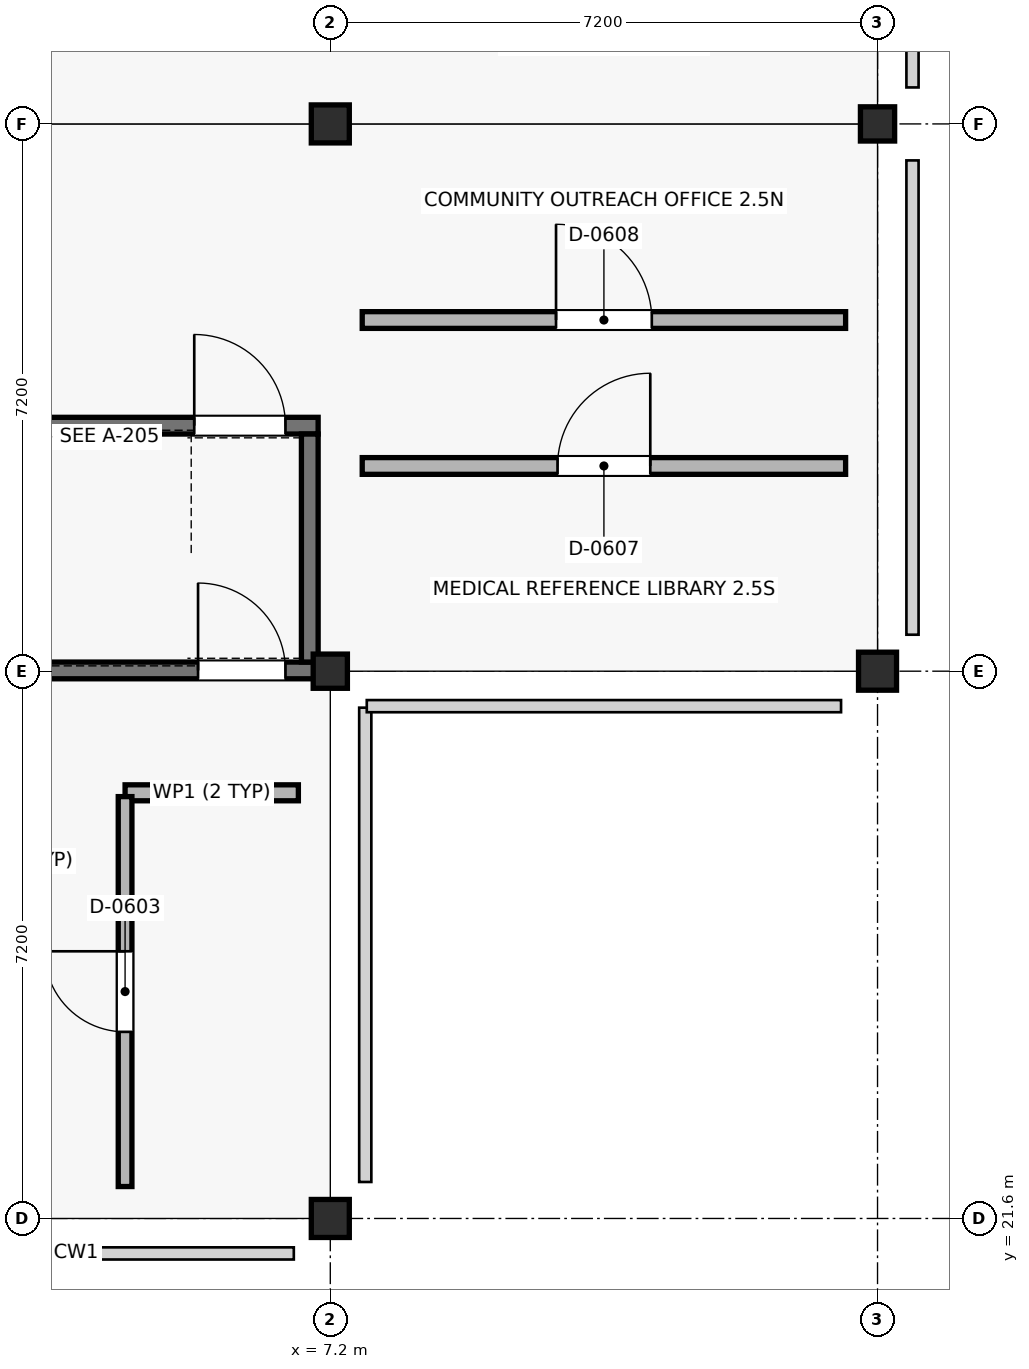
"""IFC4 building model, lengths in metres.
Left out: names, types, materials, properties, quantities, classifications, styles, units other than length and angle.
Written with IfcOpenShell. Run it as: python <this file> out.ifc"""

import sys

from ifc_helpers import new_model, si_unit, direction, frame, frame_2d, origin, origin_2d, place, context, subcontext, project, spatial, rectangle, extrude, element, fill, save


model = new_model("IFC4")
c1 = context("Model", 3, precision=1e-05, world=origin(), true_north=direction((0.0, 1.0)))
c2 = subcontext(c1, "Body", "Model", "MODEL_VIEW")
j1 = project(units=[si_unit("LENGTHUNIT", "METRE"), si_unit("PLANEANGLEUNIT", "RADIAN")], contexts=[c1])
p1 = place(None, origin())
s1 = spatial("IfcSite", under=j1, at=p1, CompositionType="ELEMENT")
p2 = place(p1, origin())
s2 = spatial("IfcBuilding", under=s1, at=p2, CompositionType="ELEMENT")
p3 = place(p2, frame((0.0, 0.0, 13.5)))
s3 = spatial("IfcBuildingStorey", under=s2, at=p3, CompositionType="ELEMENT", Elevation=13.5)
p4 = place(p3, frame((7.2, 21.6, 0.0), z_axis=(0.0, 0.0, 1.0), x_axis=(1.0, 0.0, 0.0)))
e1 = element("IfcColumn", 1, at=p4, inside=s3, PredefinedType="COLUMN", context=c2, shape_type="SweptSolid", body=[
    extrude(rectangle(XDim=0.5, YDim=0.5, at=origin_2d()), origin(), (0.0, 0.0, 1.0), 3.83),
])
p5 = place(p3, frame((7.2, 28.8, 0.0), z_axis=(0.0, 0.0, 1.0), x_axis=(1.0, 0.0, 0.0)))
e2 = element("IfcColumn", 2, at=p5, inside=s3, PredefinedType="COLUMN", context=c2, shape_type="SweptSolid", body=[
    extrude(rectangle(XDim=0.45, YDim=0.45, at=origin_2d()), origin(), (0.0, 0.0, 1.0), 3.83),
])
for number, where, z_axis, x_axis in (
    (3, (7.2, 36.0, 0.0), (0.0, 0.0, 1.0), (1.0, 0.0, 0.0)),
    (4, (14.4, 28.8, 0.0), (0.0, 0.0, 1.0), (1.0, 0.0, 0.0)),
):
    element("IfcColumn", number, at=place(p3, frame(where, z_axis=z_axis, x_axis=x_axis)), inside=s3, PredefinedType="COLUMN", context=c2, shape_type="SweptSolid", body=[
        extrude(rectangle(XDim=0.5, YDim=0.5, at=origin_2d()), origin(), (0.0, 0.0, 1.0), 3.83),
    ])
p6 = place(p3, frame((14.4, 36.0, 0.0), z_axis=(0.0, 0.0, 1.0), x_axis=(1.0, 0.0, 0.0)))
e5 = element("IfcColumn", 5, at=p6, inside=s3, PredefinedType="COLUMN", context=c2, shape_type="SweptSolid", body=[
    extrude(rectangle(XDim=0.45, YDim=0.45, at=origin_2d()), origin(), (0.0, 0.0, 1.0), 3.83),
])
p7 = place(p3, frame((0.16, 28.81, 0.0), z_axis=(0.0, 0.0, 1.0), x_axis=(1.0, 0.0, 0.0)))
e6 = element("IfcWall", 6, at=p7, inside=s3, PredefinedType="SHEAR", context=c2, shape_type="SweptSolid", body=[
    extrude(rectangle(XDim=6.88, YDim=0.22, at=frame_2d((3.44, 0.0))), origin(), (0.0, 0.0, 1.0), 3.79),
])
p8 = place(p7, frame((5.3, 0.0, 0.0)))
e7 = element("IfcOpeningElement", 7, at=p8, cuts=e6, PredefinedType="OPENING", context=c2, shape_type="SweptSolid", body=[
    extrude(rectangle(XDim=1.15, YDim=2.15, at=frame_2d((0.575, 1.075))), frame((0.0, 0.12, 0.0), z_axis=(0.0, -1.0, 0.0), x_axis=(1.0, 0.0, 0.0)), (0.0, 0.0, 1.0), 0.24),
])
p9 = place(p3, frame((0.16, 32.03, 0.0), z_axis=(0.0, 0.0, 1.0), x_axis=(1.0, 0.0, 0.0)))
e8 = element("IfcWall", 8, at=p9, inside=s3, PredefinedType="SHEAR", context=c2, shape_type="SweptSolid", body=[
    extrude(rectangle(XDim=6.88, YDim=0.22, at=frame_2d((3.44, 0.0))), origin(), (0.0, 0.0, 1.0), 3.79),
])
p10 = place(p9, frame((5.25, 0.0, 0.0)))
e9 = element("IfcOpeningElement", 9, at=p10, cuts=e8, PredefinedType="OPENING", context=c2, shape_type="SweptSolid", body=[
    extrude(rectangle(XDim=1.2, YDim=2.15, at=frame_2d((0.6, 1.075))), frame((0.0, 0.12, 0.0), z_axis=(0.0, -1.0, 0.0), x_axis=(1.0, 0.0, 0.0)), (0.0, 0.0, 1.0), 0.24),
])
p11 = place(p3, frame((6.93, 28.92, 0.0), z_axis=(0.0, 0.0, 1.0), x_axis=(0.0, 1.0, 0.0)))
e10 = element("IfcWall", 10, at=p11, inside=s3, PredefinedType="SHEAR", context=c2, shape_type="SweptSolid", body=[
    extrude(rectangle(XDim=3.0, YDim=0.22, at=frame_2d((1.5, 0.0))), origin(), (0.0, 0.0, 1.0), 3.79),
])
p12 = place(p3, frame((4.5, 27.2, 0.0), z_axis=(0.0, 0.0, 1.0), x_axis=(1.0, 0.0, 0.0)))
e11 = element("IfcWall", 11, at=p12, inside=s3, PredefinedType="PLUMBINGWALL", context=c2, shape_type="SweptSolid", body=[
    extrude(rectangle(XDim=2.28, YDim=0.21, at=frame_2d((1.14, 0.0))), origin(), (0.0, 0.0, 1.0), 2.93),
])
p13 = place(p3, frame((4.5, 22.02, 0.0), z_axis=(0.0, 0.0, 1.0), x_axis=(0.0, 1.0, 0.0)))
e12 = element("IfcWall", 12, at=p13, inside=s3, PredefinedType="PARTITIONING", context=c2, shape_type="SweptSolid", body=[
    extrude(rectangle(XDim=5.13, YDim=0.18, at=frame_2d((2.565, 0.0))), origin(), (0.0, 0.0, 1.0), 2.93),
])
p14 = place(p13, frame((2.035, 0.0, 0.0)))
e13 = element("IfcOpeningElement", 13, at=p14, cuts=e12, PredefinedType="OPENING", context=c2, shape_type="SweptSolid", body=[
    extrude(rectangle(XDim=1.06, YDim=2.14, at=frame_2d((0.53, 1.07))), frame((0.0, 0.1, 0.0), z_axis=(0.0, -1.0, 0.0), x_axis=(1.0, 0.0, 0.0)), (0.0, 0.0, 1.0), 0.2),
])
p15 = place(p3, frame((7.62, 31.5, 0.0), z_axis=(0.0, 0.0, 1.0), x_axis=(1.0, 0.0, 0.0)))
e14 = element("IfcWall", 14, at=p15, inside=s3, PredefinedType="SOLIDWALL", context=c2, shape_type="SweptSolid", body=[
    extrude(rectangle(XDim=6.36, YDim=0.22, at=frame_2d((3.18, 0.0))), origin(), (0.0, 0.0, 1.0), 2.93),
])
p16 = place(p15, frame((2.57, 0.0, 0.0)))
e15 = element("IfcOpeningElement", 15, at=p16, cuts=e14, PredefinedType="OPENING", context=c2, shape_type="SweptSolid", body=[
    extrude(rectangle(XDim=1.22, YDim=2.14, at=frame_2d((0.61, 1.07))), frame((0.0, 0.12, 0.0), z_axis=(0.0, -1.0, 0.0), x_axis=(1.0, 0.0, 0.0)), (0.0, 0.0, 1.0), 0.24),
])
p17 = place(p3, frame((7.62, 33.42, 0.0), z_axis=(0.0, 0.0, 1.0), x_axis=(1.0, 0.0, 0.0)))
e16 = element("IfcWall", 16, at=p17, inside=s3, PredefinedType="SOLIDWALL", context=c2, shape_type="SweptSolid", body=[
    extrude(rectangle(XDim=6.36, YDim=0.22, at=frame_2d((3.18, 0.0))), origin(), (0.0, 0.0, 1.0), 2.93),
])
p18 = place(p17, frame((2.55, 0.0, 0.0)))
e17 = element("IfcOpeningElement", 17, at=p18, cuts=e16, PredefinedType="OPENING", context=c2, shape_type="SweptSolid", body=[
    extrude(rectangle(XDim=1.26, YDim=2.14, at=frame_2d((0.63, 1.07))), frame((0.0, 0.12, 0.0), z_axis=(0.0, -1.0, 0.0), x_axis=(1.0, 0.0, 0.0)), (0.0, 0.0, 1.0), 0.24),
])
p19 = place(p10, origin())
e18 = element("IfcDoor", 18, at=p19, inside=s3, OperationType="SINGLE_SWING_LEFT", PredefinedType="DOOR", context=c2, shape_type="SweptSolid", body=[
    extrude(rectangle(XDim=1.2, YDim=2.15, at=frame_2d((0.6, 1.075))), frame((0.0, 0.025, 0.0), z_axis=(0.0, -1.0, 0.0), x_axis=(1.0, 0.0, 0.0)), (0.0, 0.0, 1.0), 0.05),
])
fill(e9, e18)
p20 = place(p8, origin())
e19 = element("IfcDoor", 19, at=p20, inside=s3, OperationType="SINGLE_SWING_LEFT", PredefinedType="DOOR", context=c2, shape_type="SweptSolid", body=[
    extrude(rectangle(XDim=1.15, YDim=2.15, at=frame_2d((0.575, 1.075))), frame((0.0, 0.025, 0.0), z_axis=(0.0, -1.0, 0.0), x_axis=(1.0, 0.0, 0.0)), (0.0, 0.0, 1.0), 0.05),
])
fill(e7, e19)
p21 = place(p14, origin())
e20 = element("IfcDoor", 20, at=p21, inside=s3, OperationType="SINGLE_SWING_RIGHT", PredefinedType="DOOR", context=c2, shape_type="SweptSolid", body=[
    extrude(rectangle(XDim=1.06, YDim=2.14, at=frame_2d((0.53, 1.07))), frame((0.0, 0.025, 0.0), z_axis=(0.0, -1.0, 0.0), x_axis=(1.0, 0.0, 0.0)), (0.0, 0.0, 1.0), 0.05),
])
fill(e13, e20)
p22 = place(p16, origin())
e21 = element("IfcDoor", 21, at=p22, inside=s3, OperationType="SINGLE_SWING_RIGHT", PredefinedType="DOOR", context=c2, shape_type="SweptSolid", body=[
    extrude(rectangle(XDim=1.22, YDim=2.14, at=frame_2d((0.61, 1.07))), frame((0.0, 0.025, 0.0), z_axis=(0.0, -1.0, 0.0), x_axis=(1.0, 0.0, 0.0)), (0.0, 0.0, 1.0), 0.05),
])
fill(e15, e21)
p23 = place(p18, origin())
e22 = element("IfcDoor", 22, at=p23, inside=s3, OperationType="SINGLE_SWING_LEFT", PredefinedType="DOOR", context=c2, shape_type="SweptSolid", body=[
    extrude(rectangle(XDim=1.26, YDim=2.14, at=frame_2d((0.63, 1.07))), frame((0.0, 0.025, 0.0), z_axis=(0.0, -1.0, 0.0), x_axis=(1.0, 0.0, 0.0)), (0.0, 0.0, 1.0), 0.05),
])
fill(e17, e22)
save(model, sys.argv[1])
